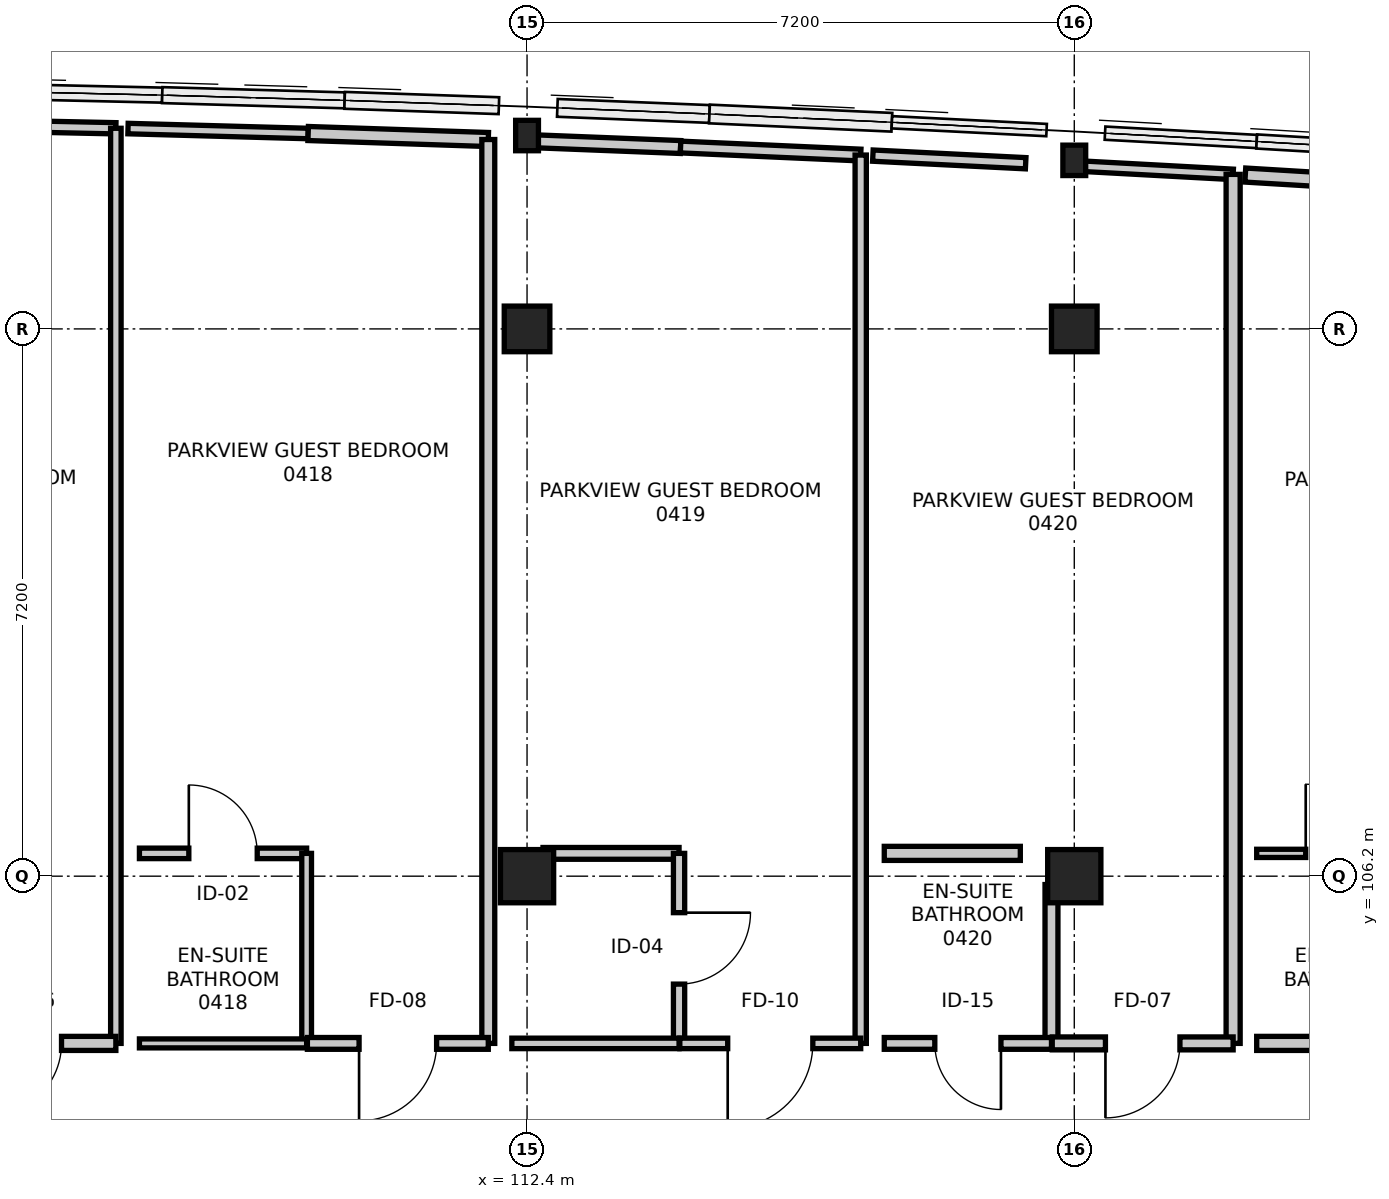
"""IFC4 building model, lengths in metres.
Left out: names, types, materials, properties, quantities, classifications, styles, units other than length and angle.
Written with IfcOpenShell. Run it as: python <this file> out.ifc"""

import sys

from ifc_helpers import new_model, si_unit, direction, frame, frame_2d, origin, origin_2d, place, context, subcontext, project, spatial, rectangle, i_section, extrude, element, fill, save


model = new_model("IFC4")
c1 = context("Model", 3, precision=1e-05, world=origin(), true_north=direction((0.0, 1.0)))
c2 = subcontext(c1, "Body", "Model", "MODEL_VIEW")
j1 = project(units=[si_unit("LENGTHUNIT", "METRE"), si_unit("PLANEANGLEUNIT", "RADIAN")], contexts=[c1])
p1 = place(None, origin())
s1 = spatial("IfcSite", under=j1, at=p1, CompositionType="ELEMENT")
p2 = place(p1, origin())
s2 = spatial("IfcBuilding", under=s1, at=p2, CompositionType="ELEMENT")
p3 = place(p2, frame((0.0, 0.0, 19.2)))
s3 = spatial("IfcBuildingStorey", under=s2, at=p3, CompositionType="ELEMENT", Elevation=19.2)
p4 = place(p3, frame((112.4, 106.2, 0.0), z_axis=(0.0, 0.0, 1.0), x_axis=(1.0, 0.0, 0.0)))
e1 = element("IfcColumn", 1, at=p4, inside=s3, PredefinedType="COLUMN", context=c2, shape_type="SweptSolid", body=[
    extrude(rectangle(XDim=0.7, YDim=0.7, at=origin_2d()), origin(), (0.0, 0.0, 1.0), 3.6),
])
p5 = place(p3, frame((112.4, 113.4, 0.0), z_axis=(0.0, 0.0, 1.0), x_axis=(1.0, 0.0, 0.0)))
e2 = element("IfcColumn", 2, at=p5, inside=s3, PredefinedType="COLUMN", context=c2, shape_type="SweptSolid", body=[
    extrude(rectangle(XDim=0.6, YDim=0.6, at=origin_2d()), origin(), (0.0, 0.0, 1.0), 3.6),
])
p6 = place(p3, frame((112.4, 115.944, 0.0), z_axis=(0.0, 0.0, 1.0), x_axis=(1.0, 0.0, 0.0)))
e3 = element("IfcColumn", 3, at=p6, inside=s3, PredefinedType="COLUMN", context=c2, shape_type="SweptSolid", body=[
    extrude(i_section(OverallWidth=0.3, OverallDepth=0.4, WebThickness=0.013, FlangeThickness=0.024, FilletRadius=0.027, at=origin_2d()), origin(), (0.0, 0.0, 1.0), 3.6),
])
p7 = place(p3, frame((119.6, 106.2, 0.0), z_axis=(0.0, 0.0, 1.0), x_axis=(1.0, 0.0, 0.0)))
e4 = element("IfcColumn", 4, at=p7, inside=s3, PredefinedType="COLUMN", context=c2, shape_type="SweptSolid", body=[
    extrude(rectangle(XDim=0.7, YDim=0.7, at=origin_2d()), origin(), (0.0, 0.0, 1.0), 3.6),
])
p8 = place(p3, frame((119.6, 113.4, 0.0), z_axis=(0.0, 0.0, 1.0), x_axis=(1.0, 0.0, 0.0)))
e5 = element("IfcColumn", 5, at=p8, inside=s3, PredefinedType="COLUMN", context=c2, shape_type="SweptSolid", body=[
    extrude(rectangle(XDim=0.6, YDim=0.6, at=origin_2d()), origin(), (0.0, 0.0, 1.0), 3.6),
])
p9 = place(p3, frame((119.6, 115.618, 0.0), z_axis=(0.0, 0.0, 1.0), x_axis=(1.0, 0.0, 0.0)))
e6 = element("IfcColumn", 6, at=p9, inside=s3, PredefinedType="COLUMN", context=c2, shape_type="SweptSolid", body=[
    extrude(i_section(OverallWidth=0.3, OverallDepth=0.4, WebThickness=0.013, FlangeThickness=0.024, FilletRadius=0.027, at=origin_2d()), origin(), (0.0, 0.0, 1.0), 3.6),
])
p10 = place(p3, frame((104.62, 116.089, 0.0), z_axis=(0.0, 0.0, 1.0), x_axis=(0.999781400282, -0.020908171861, 0.0)))
e7 = element("IfcWall", 7, at=p10, inside=s3, PredefinedType="PARTITIONING", context=c2, shape_type="SweptSolid", body=[
    extrude(rectangle(XDim=2.37, YDim=0.148, at=frame_2d((1.185, 0.0))), origin(), (0.0, 0.0, 1.0), 2.926),
])
p11 = place(p3, frame((106.99, 116.04, 0.0), z_axis=(0.0, 0.0, 1.0), x_axis=(0.0, -1.0, 0.0)))
e8 = element("IfcWall", 8, at=p11, inside=s3, PredefinedType="PARTITIONING", context=c2, shape_type="SweptSolid", body=[
    extrude(rectangle(XDim=12.04, YDim=0.138, at=frame_2d((6.02, 0.0))), origin(), (0.0, 0.0, 1.0), 2.735),
])
p12 = place(p3, frame((106.99, 104.0, 0.0), z_axis=(0.0, 0.0, 1.0), x_axis=(-1.0, 0.0, 0.0)))
e9 = element("IfcWall", 9, at=p12, inside=s3, PredefinedType="PARTITIONING", context=c2, shape_type="SweptSolid", body=[
    extrude(rectangle(XDim=2.38, YDim=0.185, at=frame_2d((1.19, 0.0))), origin(), (0.0, 0.0, 1.0), 2.685),
])
p13 = place(p12, frame((0.715, 0.0, 0.0)))
e10 = element("IfcOpeningElement", 10, at=p13, cuts=e9, PredefinedType="OPENING", context=c2, shape_type="SweptSolid", body=[
    extrude(rectangle(XDim=0.95, YDim=2.1, at=frame_2d((0.475, 1.05))), frame((0.0, 0.103, 0.0), z_axis=(0.0, -1.0, 0.0), x_axis=(1.0, 0.0, 0.0)), (0.0, 0.0, 1.0), 0.205),
])
p14 = place(p3, frame((107.3, 106.5, 0.0), z_axis=(0.0, 0.0, 1.0), x_axis=(1.0, 0.0, 0.0)))
e11 = element("IfcWall", 11, at=p14, inside=s3, PredefinedType="PARTITIONING", context=c2, shape_type="SweptSolid", body=[
    extrude(rectangle(XDim=2.2, YDim=0.138, at=frame_2d((1.1, 0.0))), origin(), (0.0, 0.0, 1.0), 3.35),
])
p15 = place(p14, frame((0.65, 0.0, 0.0)))
e12 = element("IfcOpeningElement", 12, at=p15, cuts=e11, PredefinedType="OPENING", context=c2, shape_type="SweptSolid", body=[
    extrude(rectangle(XDim=0.9, YDim=2.08, at=frame_2d((0.45, 1.04))), frame((0.0, 0.079, 0.0), z_axis=(0.0, -1.0, 0.0), x_axis=(1.0, 0.0, 0.0)), (0.0, 0.0, 1.0), 0.158),
])
p16 = place(p3, frame((109.5, 106.5, 0.0), z_axis=(0.0, 0.0, 1.0), x_axis=(0.0, -1.0, 0.0)))
e13 = element("IfcWall", 13, at=p16, inside=s3, PredefinedType="PARTITIONING", context=c2, shape_type="SweptSolid", body=[
    extrude(rectangle(XDim=2.5, YDim=0.128, at=frame_2d((1.25, 0.0))), origin(), (0.0, 0.0, 1.0), 2.735),
])
p17 = place(p3, frame((109.5, 104.0, 0.0), z_axis=(0.0, 0.0, 1.0), x_axis=(-1.0, 0.0, 0.0)))
e14 = element("IfcWall", 14, at=p17, inside=s3, PredefinedType="PARTITIONING", context=c2, shape_type="SweptSolid", body=[
    extrude(rectangle(XDim=2.2, YDim=0.118, at=frame_2d((1.1, 0.0))), origin(), (0.0, 0.0, 1.0), 3.35),
])
p18 = place(p3, frame((107.15, 116.036, 0.0), z_axis=(0.0, 0.0, 1.0), x_axis=(0.999622004443, -0.027492694189, 0.0)))
e15 = element("IfcWall", 15, at=p18, inside=s3, PredefinedType="PARTITIONING", context=c2, shape_type="SweptSolid", body=[
    extrude(rectangle(XDim=2.371, YDim=0.138, at=frame_2d((1.186, 0.0))), origin(), (0.0, 0.0, 1.0), 2.926),
])
p19 = place(p3, frame((109.52, 115.971, 0.0), z_axis=(0.0, 0.0, 1.0), x_axis=(0.99944342042, -0.033359397158, 0.0)))
e16 = element("IfcWall", 16, at=p19, inside=s3, PredefinedType="PARTITIONING", context=c2, shape_type="SweptSolid", body=[
    extrude(rectangle(XDim=2.371, YDim=0.185, at=frame_2d((1.186, 0.0))), origin(), (0.0, 0.0, 1.0), 2.926),
])
p20 = place(p3, frame((111.89, 115.892, 0.0), z_axis=(0.0, 0.0, 1.0), x_axis=(0.0, -1.0, 0.0)))
e17 = element("IfcWall", 17, at=p20, inside=s3, PredefinedType="PARTITIONING", context=c2, shape_type="SweptSolid", body=[
    extrude(rectangle(XDim=11.892, YDim=0.17, at=frame_2d((5.946, 0.0))), origin(), (0.0, 0.0, 1.0), 2.735),
])
p21 = place(p3, frame((111.89, 104.0, 0.0), z_axis=(0.0, 0.0, 1.0), x_axis=(-1.0, 0.0, 0.0)))
e18 = element("IfcWall", 18, at=p21, inside=s3, PredefinedType="PARTITIONING", context=c2, shape_type="SweptSolid", body=[
    extrude(rectangle(XDim=2.38, YDim=0.155, at=frame_2d((1.19, 0.0))), origin(), (0.0, 0.0, 1.0), 3.35),
])
p22 = place(p21, frame((0.68, 0.0, 0.0)))
e19 = element("IfcOpeningElement", 19, at=p22, cuts=e18, PredefinedType="OPENING", context=c2, shape_type="SweptSolid", body=[
    extrude(rectangle(XDim=1.02, YDim=2.15, at=frame_2d((0.51, 1.075))), frame((0.0, 0.087, 0.0), z_axis=(0.0, -1.0, 0.0), x_axis=(1.0, 0.0, 0.0)), (0.0, 0.0, 1.0), 0.175),
])
p23 = place(p3, frame((112.61, 106.5, 0.0), z_axis=(0.0, 0.0, 1.0), x_axis=(1.0, 0.0, 0.0)))
e20 = element("IfcWall", 20, at=p23, inside=s3, PredefinedType="PARTITIONING", context=c2, shape_type="SweptSolid", body=[
    extrude(rectangle(XDim=1.79, YDim=0.155, at=frame_2d((0.895, 0.0))), origin(), (0.0, 0.0, 1.0), 2.685),
])
p24 = place(p3, frame((114.4, 106.5, 0.0), z_axis=(0.0, 0.0, 1.0), x_axis=(0.0, -1.0, 0.0)))
e21 = element("IfcWall", 21, at=p24, inside=s3, PredefinedType="PARTITIONING", context=c2, shape_type="SweptSolid", body=[
    extrude(rectangle(XDim=2.5, YDim=0.148, at=frame_2d((1.25, 0.0))), origin(), (0.0, 0.0, 1.0), 2.735),
])
p25 = place(p24, frame((0.78, 0.0, 0.0)))
e22 = element("IfcOpeningElement", 22, at=p25, cuts=e21, PredefinedType="OPENING", context=c2, shape_type="SweptSolid", body=[
    extrude(rectangle(XDim=0.94, YDim=2.12, at=frame_2d((0.47, 1.06))), frame((0.0, 0.084, 0.0), z_axis=(0.0, -1.0, 0.0), x_axis=(1.0, 0.0, 0.0)), (0.0, 0.0, 1.0), 0.168),
])
p26 = place(p3, frame((114.4, 104.0, 0.0), z_axis=(0.0, 0.0, 1.0), x_axis=(-1.0, 0.0, 0.0)))
e23 = element("IfcWall", 23, at=p26, inside=s3, PredefinedType="PARTITIONING", context=c2, shape_type="SweptSolid", body=[
    extrude(rectangle(XDim=2.2, YDim=0.138, at=frame_2d((1.1, 0.0))), origin(), (0.0, 0.0, 1.0), 2.685),
])
p27 = place(p3, frame((112.41, 115.872, 0.0), z_axis=(0.0, 0.0, 1.0), x_axis=(0.999226724362, -0.039318612909, 0.0)))
e24 = element("IfcWall", 24, at=p27, inside=s3, PredefinedType="PARTITIONING", context=c2, shape_type="SweptSolid", body=[
    extrude(rectangle(XDim=2.012, YDim=0.17, at=frame_2d((1.006, 0.0))), origin(), (0.0, 0.0, 1.0), 2.926),
])
p28 = place(p3, frame((114.42, 115.793, 0.0), z_axis=(0.0, 0.0, 1.0), x_axis=(0.999006795059, -0.044558090468, 0.0)))
e25 = element("IfcWall", 25, at=p28, inside=s3, PredefinedType="PARTITIONING", context=c2, shape_type="SweptSolid", body=[
    extrude(rectangle(XDim=2.373, YDim=0.155, at=frame_2d((1.186, 0.0))), origin(), (0.0, 0.0, 1.0), 2.926),
])
p29 = place(p3, frame((116.79, 115.687, 0.0), z_axis=(0.0, 0.0, 1.0), x_axis=(0.0, -1.0, 0.0)))
e26 = element("IfcWall", 26, at=p29, inside=s3, PredefinedType="PARTITIONING", context=c2, shape_type="SweptSolid", body=[
    extrude(rectangle(XDim=11.687, YDim=0.148, at=frame_2d((5.844, 0.0))), origin(), (0.0, 0.0, 1.0), 2.735),
])
p30 = place(p3, frame((116.79, 104.0, 0.0), z_axis=(0.0, 0.0, 1.0), x_axis=(-1.0, 0.0, 0.0)))
e27 = element("IfcWall", 27, at=p30, inside=s3, PredefinedType="PARTITIONING", context=c2, shape_type="SweptSolid", body=[
    extrude(rectangle(XDim=2.38, YDim=0.138, at=frame_2d((1.19, 0.0))), origin(), (0.0, 0.0, 1.0), 3.35),
])
p31 = place(p30, frame((0.63, 0.0, 0.0)))
e28 = element("IfcOpeningElement", 28, at=p31, cuts=e27, PredefinedType="OPENING", context=c2, shape_type="SweptSolid", body=[
    extrude(rectangle(XDim=1.12, YDim=2.2, at=frame_2d((0.56, 1.1))), frame((0.0, 0.079, 0.0), z_axis=(0.0, -1.0, 0.0), x_axis=(1.0, 0.0, 0.0)), (0.0, 0.0, 1.0), 0.158),
])
p32 = place(p3, frame((117.1, 106.5, 0.0), z_axis=(0.0, 0.0, 1.0), x_axis=(1.0, 0.0, 0.0)))
e29 = element("IfcWall", 29, at=p32, inside=s3, PredefinedType="PARTITIONING", context=c2, shape_type="SweptSolid", body=[
    extrude(rectangle(XDim=1.79, YDim=0.185, at=frame_2d((0.895, 0.0))), origin(), (0.0, 0.0, 1.0), 2.735),
])
p33 = place(p3, frame((119.3, 106.09, 0.0), z_axis=(0.0, 0.0, 1.0), x_axis=(0.0, -1.0, 0.0)))
e30 = element("IfcWall", 30, at=p33, inside=s3, PredefinedType="PARTITIONING", context=c2, shape_type="SweptSolid", body=[
    extrude(rectangle(XDim=2.09, YDim=0.17, at=frame_2d((1.045, 0.0))), origin(), (0.0, 0.0, 1.0), 2.685),
])
p34 = place(p3, frame((119.3, 104.0, 0.0), z_axis=(0.0, 0.0, 1.0), x_axis=(-1.0, 0.0, 0.0)))
e31 = element("IfcWall", 31, at=p34, inside=s3, PredefinedType="PARTITIONING", context=c2, shape_type="SweptSolid", body=[
    extrude(rectangle(XDim=2.2, YDim=0.155, at=frame_2d((1.1, 0.0))), origin(), (0.0, 0.0, 1.0), 3.35),
])
p35 = place(p34, frame((0.665, 0.0, 0.0)))
e32 = element("IfcOpeningElement", 32, at=p35, cuts=e31, PredefinedType="OPENING", context=c2, shape_type="SweptSolid", body=[
    extrude(rectangle(XDim=0.87, YDim=2.07, at=frame_2d((0.435, 1.035))), frame((0.0, 0.087, 0.0), z_axis=(0.0, -1.0, 0.0), x_axis=(1.0, 0.0, 0.0)), (0.0, 0.0, 1.0), 0.175),
])
p36 = place(p3, frame((116.95, 115.68, 0.0), z_axis=(0.0, 0.0, 1.0), x_axis=(0.998756871488, -0.049846882111, 0.0)))
e33 = element("IfcWall", 33, at=p36, inside=s3, PredefinedType="PARTITIONING", context=c2, shape_type="SweptSolid", body=[
    extrude(rectangle(XDim=2.013, YDim=0.148, at=frame_2d((1.006, 0.0))), origin(), (0.0, 0.0, 1.0), 2.926),
])
p37 = place(p3, frame((119.679, 115.542, 0.0), z_axis=(0.0, 0.0, 1.0), x_axis=(0.998523490871, -0.054321617961, 0.0)))
e34 = element("IfcWall", 34, at=p37, inside=s3, PredefinedType="PARTITIONING", context=c2, shape_type="SweptSolid", body=[
    extrude(rectangle(XDim=2.013, YDim=0.138, at=frame_2d((1.007, 0.0))), origin(), (0.0, 0.0, 1.0), 2.926),
])
p38 = place(p3, frame((121.69, 115.433, 0.0), z_axis=(0.0, 0.0, 1.0), x_axis=(0.0, -1.0, 0.0)))
e35 = element("IfcWall", 35, at=p38, inside=s3, PredefinedType="PARTITIONING", context=c2, shape_type="SweptSolid", body=[
    extrude(rectangle(XDim=11.433, YDim=0.185, at=frame_2d((5.716, 0.0))), origin(), (0.0, 0.0, 1.0), 2.735),
])
p39 = place(p3, frame((121.69, 104.0, 0.0), z_axis=(0.0, 0.0, 1.0), x_axis=(-1.0, 0.0, 0.0)))
e36 = element("IfcWall", 36, at=p39, inside=s3, PredefinedType="PARTITIONING", context=c2, shape_type="SweptSolid", body=[
    extrude(rectangle(XDim=2.38, YDim=0.17, at=frame_2d((1.19, 0.0))), origin(), (0.0, 0.0, 1.0), 2.685),
])
p40 = place(p39, frame((0.7, 0.0, 0.0)))
e37 = element("IfcOpeningElement", 37, at=p40, cuts=e36, PredefinedType="OPENING", context=c2, shape_type="SweptSolid", body=[
    extrude(rectangle(XDim=0.98, YDim=2.15, at=frame_2d((0.49, 1.075))), frame((0.0, 0.095, 0.0), z_axis=(0.0, -1.0, 0.0), x_axis=(1.0, 0.0, 0.0)), (0.0, 0.0, 1.0), 0.19),
])
p41 = place(p3, frame((122.0, 106.5, 0.0), z_axis=(0.0, 0.0, 1.0), x_axis=(1.0, 0.0, 0.0)))
e38 = element("IfcWall", 38, at=p41, inside=s3, PredefinedType="PARTITIONING", context=c2, shape_type="SweptSolid", body=[
    extrude(rectangle(XDim=2.2, YDim=0.108, at=frame_2d((1.1, 0.0))), origin(), (0.0, 0.0, 1.0), 3.35),
])
p42 = place(p41, frame((0.645, 0.0, 0.0)))
e39 = element("IfcOpeningElement", 39, at=p42, cuts=e38, PredefinedType="OPENING", context=c2, shape_type="SweptSolid", body=[
    extrude(rectangle(XDim=0.91, YDim=2.11, at=frame_2d((0.455, 1.055))), frame((0.0, 0.064, 0.0), z_axis=(0.0, -1.0, 0.0), x_axis=(1.0, 0.0, 0.0)), (0.0, 0.0, 1.0), 0.128),
])
p43 = place(p3, frame((124.2, 104.0, 0.0), z_axis=(0.0, 0.0, 1.0), x_axis=(-1.0, 0.0, 0.0)))
e40 = element("IfcWall", 40, at=p43, inside=s3, PredefinedType="PARTITIONING", context=c2, shape_type="SweptSolid", body=[
    extrude(rectangle(XDim=2.2, YDim=0.185, at=frame_2d((1.1, 0.0))), origin(), (0.0, 0.0, 1.0), 3.35),
])
p44 = place(p3, frame((121.85, 115.424, 0.0), z_axis=(0.0, 0.0, 1.0), x_axis=(0.998176732674, -0.060359012147, 0.0)))
e41 = element("IfcWall", 41, at=p44, inside=s3, PredefinedType="PARTITIONING", context=c2, shape_type="SweptSolid", body=[
    extrude(rectangle(XDim=4.389, YDim=0.185, at=frame_2d((2.194, 0.0))), origin(), (0.0, 0.0, 1.0), 2.926),
])
p45 = place(p13, origin())
e42 = element("IfcDoor", 42, at=p45, inside=s3, OperationType="SINGLE_SWING_RIGHT", PredefinedType="DOOR", context=c2, shape_type="SweptSolid", body=[
    extrude(rectangle(XDim=0.95, YDim=2.1, at=frame_2d((0.475, 1.05))), frame((0.0, 0.025, 0.0), z_axis=(0.0, -1.0, 0.0), x_axis=(1.0, 0.0, 0.0)), (0.0, 0.0, 1.0), 0.05),
])
fill(e10, e42)
p46 = place(p15, origin())
e43 = element("IfcDoor", 43, at=p46, inside=s3, OperationType="SINGLE_SWING_LEFT", PredefinedType="DOOR", context=c2, shape_type="SweptSolid", body=[
    extrude(rectangle(XDim=0.9, YDim=2.08, at=frame_2d((0.45, 1.04))), frame((0.0, 0.025, 0.0), z_axis=(0.0, -1.0, 0.0), x_axis=(1.0, 0.0, 0.0)), (0.0, 0.0, 1.0), 0.05),
])
fill(e12, e43)
p47 = place(p22, origin())
e44 = element("IfcDoor", 44, at=p47, inside=s3, OperationType="SINGLE_SWING_RIGHT", PredefinedType="DOOR", context=c2, shape_type="SweptSolid", body=[
    extrude(rectangle(XDim=1.02, YDim=2.15, at=frame_2d((0.51, 1.075))), frame((0.0, 0.025, 0.0), z_axis=(0.0, -1.0, 0.0), x_axis=(1.0, 0.0, 0.0)), (0.0, 0.0, 1.0), 0.05),
])
fill(e19, e44)
p48 = place(p25, origin())
e45 = element("IfcDoor", 45, at=p48, inside=s3, OperationType="SINGLE_SWING_LEFT", PredefinedType="DOOR", context=c2, shape_type="SweptSolid", body=[
    extrude(rectangle(XDim=0.94, YDim=2.12, at=frame_2d((0.47, 1.06))), frame((0.0, 0.025, 0.0), z_axis=(0.0, -1.0, 0.0), x_axis=(1.0, 0.0, 0.0)), (0.0, 0.0, 1.0), 0.05),
])
fill(e22, e45)
p49 = place(p31, origin())
e46 = element("IfcDoor", 46, at=p49, inside=s3, OperationType="SINGLE_SWING_RIGHT", PredefinedType="DOOR", context=c2, shape_type="SweptSolid", body=[
    extrude(rectangle(XDim=1.12, YDim=2.2, at=frame_2d((0.56, 1.1))), frame((0.0, 0.025, 0.0), z_axis=(0.0, -1.0, 0.0), x_axis=(1.0, 0.0, 0.0)), (0.0, 0.0, 1.0), 0.05),
])
fill(e28, e46)
p50 = place(p35, origin())
e47 = element("IfcDoor", 47, at=p50, inside=s3, OperationType="SINGLE_SWING_LEFT", PredefinedType="DOOR", context=c2, shape_type="SweptSolid", body=[
    extrude(rectangle(XDim=0.87, YDim=2.07, at=frame_2d((0.435, 1.035))), frame((0.0, 0.025, 0.0), z_axis=(0.0, -1.0, 0.0), x_axis=(1.0, 0.0, 0.0)), (0.0, 0.0, 1.0), 0.05),
])
fill(e32, e47)
p51 = place(p40, origin())
e48 = element("IfcDoor", 48, at=p51, inside=s3, OperationType="SINGLE_SWING_RIGHT", PredefinedType="DOOR", context=c2, shape_type="SweptSolid", body=[
    extrude(rectangle(XDim=0.98, YDim=2.15, at=frame_2d((0.49, 1.075))), frame((0.0, 0.025, 0.0), z_axis=(0.0, -1.0, 0.0), x_axis=(1.0, 0.0, 0.0)), (0.0, 0.0, 1.0), 0.05),
])
fill(e37, e48)
p52 = place(p42, origin())
e49 = element("IfcDoor", 49, at=p52, inside=s3, OperationType="SINGLE_SWING_LEFT", PredefinedType="DOOR", context=c2, shape_type="SweptSolid", body=[
    extrude(rectangle(XDim=0.91, YDim=2.11, at=frame_2d((0.455, 1.055))), frame((0.0, 0.025, 0.0), z_axis=(0.0, -1.0, 0.0), x_axis=(1.0, 0.0, 0.0)), (0.0, 0.0, 1.0), 0.05),
])
fill(e39, e49)
save(model, sys.argv[1])
